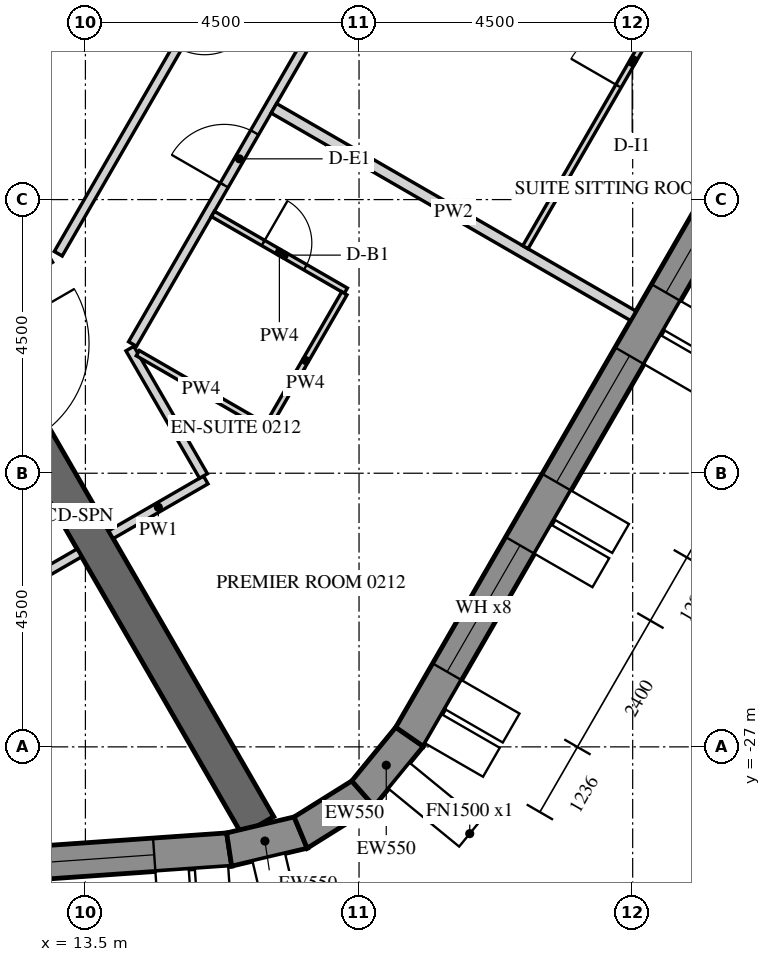
"""IFC4 building model, lengths in metres.
Left out: names, types, materials, properties, quantities, classifications, styles, units other than length and angle.
Written with IfcOpenShell. Run it as: python <this file> out.ifc"""

import sys

from ifc_helpers import new_model, si_unit, direction, frame, frame_2d, origin, place, context, subcontext, project, spatial, polyline, rectangle, outline, extrude, element, fill, save


model = new_model("IFC4")
c1 = context("Model", 3, precision=1e-05, world=origin(), true_north=direction((0.0, 1.0)))
c2 = subcontext(c1, "Body", "Model", "MODEL_VIEW")
j1 = project(units=[si_unit("LENGTHUNIT", "METRE"), si_unit("PLANEANGLEUNIT", "RADIAN")], contexts=[c1])
p1 = place(None, origin())
s1 = spatial("IfcSite", under=j1, at=p1, CompositionType="ELEMENT")
p2 = place(p1, origin())
s2 = spatial("IfcBuilding", under=s1, at=p2, CompositionType="ELEMENT")
p3 = place(p2, frame((0.0, 0.0, 49.2)))
s3 = spatial("IfcBuildingStorey", under=s2, at=p3, CompositionType="ELEMENT", Elevation=49.2)
p4 = place(p3, frame((-14.134, -30.786, -0.15), z_axis=(0.0, 0.0, 1.0), x_axis=(0.997564037441, 0.069756657061, 0.0)))
e1 = element("IfcWall", 1, at=p4, inside=s3, PredefinedType="SOLIDWALL", context=c2, shape_type="SweptSolid", body=[
    extrude(outline(polyline([(-0.026, -0.275), (30.094, -0.275), (30.049, 0.275), (0.026, 0.275), (-0.026, -0.275)])), origin(), (0.0, 0.0, 1.0), 3.9),
])
p5 = place(p4, frame((1.236, 0.0, 1.05)))
e2 = element("IfcOpeningElement", 2, at=p5, cuts=e1, PredefinedType="OPENING", context=c2, shape_type="SweptSolid", body=[
    extrude(rectangle(XDim=2.4, YDim=2.4, at=frame_2d((1.2, 1.2))), frame((0.0, 0.285, 0.0), z_axis=(0.0, -1.0, 0.0), x_axis=(1.0, 0.0, 0.0)), (0.0, 0.0, 1.0), 0.57),
])
p6 = place(p4, frame((4.835, 0.0, 1.05)))
e3 = element("IfcOpeningElement", 3, at=p6, cuts=e1, PredefinedType="OPENING", context=c2, shape_type="SweptSolid", body=[
    extrude(rectangle(XDim=2.4, YDim=2.4, at=frame_2d((1.2, 1.2))), frame((0.0, 0.285, 0.0), z_axis=(0.0, -1.0, 0.0), x_axis=(1.0, 0.0, 0.0)), (0.0, 0.0, 1.0), 0.57),
])
p7 = place(p4, frame((8.436, 0.0, 1.05)))
e4 = element("IfcOpeningElement", 4, at=p7, cuts=e1, PredefinedType="OPENING", context=c2, shape_type="SweptSolid", body=[
    extrude(rectangle(XDim=2.4, YDim=2.4, at=frame_2d((1.2, 1.2))), frame((0.0, 0.285, 0.0), z_axis=(0.0, -1.0, 0.0), x_axis=(1.0, 0.0, 0.0)), (0.0, 0.0, 1.0), 0.57),
])
p8 = place(p4, frame((12.035, 0.0, 1.05)))
e5 = element("IfcOpeningElement", 5, at=p8, cuts=e1, PredefinedType="OPENING", context=c2, shape_type="SweptSolid", body=[
    extrude(rectangle(XDim=2.4, YDim=2.4, at=frame_2d((1.2, 1.2))), frame((0.0, 0.285, 0.0), z_axis=(0.0, -1.0, 0.0), x_axis=(1.0, 0.0, 0.0)), (0.0, 0.0, 1.0), 0.57),
])
p9 = place(p4, frame((15.635, 0.0, 1.05)))
e6 = element("IfcOpeningElement", 6, at=p9, cuts=e1, PredefinedType="OPENING", context=c2, shape_type="SweptSolid", body=[
    extrude(rectangle(XDim=2.4, YDim=2.4, at=frame_2d((1.2, 1.2))), frame((0.0, 0.285, 0.0), z_axis=(0.0, -1.0, 0.0), x_axis=(1.0, 0.0, 0.0)), (0.0, 0.0, 1.0), 0.57),
])
p10 = place(p4, frame((19.236, 0.0, 1.05)))
e7 = element("IfcOpeningElement", 7, at=p10, cuts=e1, PredefinedType="OPENING", context=c2, shape_type="SweptSolid", body=[
    extrude(rectangle(XDim=2.4, YDim=2.4, at=frame_2d((1.2, 1.2))), frame((0.0, 0.285, 0.0), z_axis=(0.0, -1.0, 0.0), x_axis=(1.0, 0.0, 0.0)), (0.0, 0.0, 1.0), 0.57),
])
p11 = place(p4, frame((22.835, 0.0, 1.05)))
e8 = element("IfcOpeningElement", 8, at=p11, cuts=e1, PredefinedType="OPENING", context=c2, shape_type="SweptSolid", body=[
    extrude(rectangle(XDim=2.4, YDim=2.4, at=frame_2d((1.2, 1.2))), frame((0.0, 0.285, 0.0), z_axis=(0.0, -1.0, 0.0), x_axis=(1.0, 0.0, 0.0)), (0.0, 0.0, 1.0), 0.57),
])
p12 = place(p4, frame((26.436, 0.0, 1.05)))
e9 = element("IfcOpeningElement", 9, at=p12, cuts=e1, PredefinedType="OPENING", context=c2, shape_type="SweptSolid", body=[
    extrude(rectangle(XDim=2.4, YDim=2.4, at=frame_2d((1.2, 1.2))), frame((0.0, 0.285, 0.0), z_axis=(0.0, -1.0, 0.0), x_axis=(1.0, 0.0, 0.0)), (0.0, 0.0, 1.0), 0.57),
])
p13 = place(p3, frame((15.864, -28.688, -0.15), z_axis=(0.0, 0.0, 1.0), x_axis=(0.973063591128, 0.230536868247, 0.0)))
e10 = element("IfcWall", 10, at=p13, inside=s3, PredefinedType="SOLIDWALL", context=c2, shape_type="SweptSolid", body=[
    extrude(outline(polyline([(-0.022, -0.275), (1.253, -0.275), (1.163, 0.275), (0.022, 0.275), (-0.022, -0.275)])), origin(), (0.0, 0.0, 1.0), 3.9),
])
p14 = place(p3, frame((17.04, -28.41, -0.15), z_axis=(0.0, 0.0, 1.0), x_axis=(0.847952888306, 0.530071598195, 0.0)))
e11 = element("IfcWall", 11, at=p14, inside=s3, PredefinedType="SOLIDWALL", context=c2, shape_type="SweptSolid", body=[
    extrude(outline(polyline([(-0.045, -0.275), (1.253, -0.275), (1.163, 0.275), (0.045, 0.275), (-0.045, -0.275)])), origin(), (0.0, 0.0, 1.0), 3.9),
])
p15 = place(p3, frame((18.064, -27.769, -0.15), z_axis=(0.0, 0.0, 1.0), x_axis=(0.633842757806, 0.773461930787, 0.0)))
e12 = element("IfcWall", 12, at=p15, inside=s3, PredefinedType="SOLIDWALL", context=c2, shape_type="SweptSolid", body=[
    extrude(outline(polyline([(-0.045, -0.275), (1.231, -0.275), (1.186, 0.275), (0.045, 0.275), (-0.045, -0.275)])), origin(), (0.0, 0.0, 1.0), 3.9),
])
p16 = place(p3, frame((18.83, -26.835, -0.15), z_axis=(0.0, 0.0, 1.0), x_axis=(0.500003800416, 0.866023209602, 0.0)))
e13 = element("IfcWall", 13, at=p16, inside=s3, PredefinedType="SOLIDWALL", context=c2, shape_type="SweptSolid", body=[
    extrude(outline(polyline([(-0.022, -0.275), (30.097, -0.275), (30.045, 0.275), (0.022, 0.275), (-0.022, -0.275)])), origin(), (0.0, 0.0, 1.0), 3.9),
])
p17 = place(p16, frame((1.236, 0.0, 1.05)))
e14 = element("IfcOpeningElement", 14, at=p17, cuts=e13, PredefinedType="OPENING", context=c2, shape_type="SweptSolid", body=[
    extrude(rectangle(XDim=2.4, YDim=2.4, at=frame_2d((1.2, 1.2))), frame((0.0, 0.285, 0.0), z_axis=(0.0, -1.0, 0.0), x_axis=(1.0, 0.0, 0.0)), (0.0, 0.0, 1.0), 0.57),
])
p18 = place(p16, frame((4.835, 0.0, 1.05)))
e15 = element("IfcOpeningElement", 15, at=p18, cuts=e13, PredefinedType="OPENING", context=c2, shape_type="SweptSolid", body=[
    extrude(rectangle(XDim=2.4, YDim=2.4, at=frame_2d((1.2, 1.2))), frame((0.0, 0.285, 0.0), z_axis=(0.0, -1.0, 0.0), x_axis=(1.0, 0.0, 0.0)), (0.0, 0.0, 1.0), 0.57),
])
p19 = place(p16, frame((8.436, 0.0, 1.05)))
e16 = element("IfcOpeningElement", 16, at=p19, cuts=e13, PredefinedType="OPENING", context=c2, shape_type="SweptSolid", body=[
    extrude(rectangle(XDim=2.4, YDim=2.4, at=frame_2d((1.2, 1.2))), frame((0.0, 0.285, 0.0), z_axis=(0.0, -1.0, 0.0), x_axis=(1.0, 0.0, 0.0)), (0.0, 0.0, 1.0), 0.57),
])
p20 = place(p16, frame((12.035, 0.0, 1.05)))
e17 = element("IfcOpeningElement", 17, at=p20, cuts=e13, PredefinedType="OPENING", context=c2, shape_type="SweptSolid", body=[
    extrude(rectangle(XDim=2.4, YDim=2.4, at=frame_2d((1.2, 1.2))), frame((0.0, 0.285, 0.0), z_axis=(0.0, -1.0, 0.0), x_axis=(1.0, 0.0, 0.0)), (0.0, 0.0, 1.0), 0.57),
])
p21 = place(p16, frame((15.635, 0.0, 1.05)))
e18 = element("IfcOpeningElement", 18, at=p21, cuts=e13, PredefinedType="OPENING", context=c2, shape_type="SweptSolid", body=[
    extrude(rectangle(XDim=2.4, YDim=2.4, at=frame_2d((1.2, 1.2))), frame((0.0, 0.285, 0.0), z_axis=(0.0, -1.0, 0.0), x_axis=(1.0, 0.0, 0.0)), (0.0, 0.0, 1.0), 0.57),
])
p22 = place(p16, frame((19.236, 0.0, 1.05)))
e19 = element("IfcOpeningElement", 19, at=p22, cuts=e13, PredefinedType="OPENING", context=c2, shape_type="SweptSolid", body=[
    extrude(rectangle(XDim=2.4, YDim=2.4, at=frame_2d((1.2, 1.2))), frame((0.0, 0.285, 0.0), z_axis=(0.0, -1.0, 0.0), x_axis=(1.0, 0.0, 0.0)), (0.0, 0.0, 1.0), 0.57),
])
p23 = place(p16, frame((22.835, 0.0, 1.05)))
e20 = element("IfcOpeningElement", 20, at=p23, cuts=e13, PredefinedType="OPENING", context=c2, shape_type="SweptSolid", body=[
    extrude(rectangle(XDim=2.4, YDim=2.4, at=frame_2d((1.2, 1.2))), frame((0.0, 0.285, 0.0), z_axis=(0.0, -1.0, 0.0), x_axis=(1.0, 0.0, 0.0)), (0.0, 0.0, 1.0), 0.57),
])
p24 = place(p16, frame((26.436, 0.0, 1.05)))
e21 = element("IfcOpeningElement", 21, at=p24, cuts=e13, PredefinedType="OPENING", context=c2, shape_type="SweptSolid", body=[
    extrude(rectangle(XDim=2.4, YDim=2.4, at=frame_2d((1.2, 1.2))), frame((0.0, 0.285, 0.0), z_axis=(0.0, -1.0, 0.0), x_axis=(1.0, 0.0, 0.0)), (0.0, 0.0, 1.0), 0.57),
])
p25 = place(p3, frame((8.083, -14.0, -0.15), z_axis=(0.0, 0.0, 1.0), x_axis=(0.499997680643, -0.866026742862, 0.0)))
e22 = element("IfcWall", 22, at=p25, inside=s3, PredefinedType="SHEAR", context=c2, shape_type="SweptSolid", body=[
    extrude(rectangle(XDim=16.509, YDim=0.6, at=frame_2d((8.254, 0.0))), origin(), (0.0, 0.0, 1.0), 3.9),
])
p26 = place(p25, frame((7.354, 0.0, 0.15)))
e23 = element("IfcOpeningElement", 23, at=p26, cuts=e22, PredefinedType="OPENING", context=c2, shape_type="SweptSolid", body=[
    extrude(rectangle(XDim=1.8, YDim=2.4, at=frame_2d((0.9, 1.2))), frame((0.0, 0.31, 0.0), z_axis=(0.0, -1.0, 0.0), x_axis=(1.0, 0.0, 0.0)), (0.0, 0.0, 1.0), 0.62),
])
p27 = place(p3, frame((11.906, -24.673, 0.0), z_axis=(0.0, 0.0, 1.0), x_axis=(0.866013532718, 0.500020560727, 0.0)))
e24 = element("IfcWall", 24, at=p27, inside=s3, PredefinedType="PARTITIONING", context=c2, shape_type="SweptSolid", body=[
    extrude(rectangle(XDim=1.725, YDim=0.15, at=frame_2d((0.863, 0.0))), origin(), (0.0, 0.0, 1.0), 2.988),
])
p28 = place(p3, frame((13.92, -23.51, 0.0), z_axis=(0.0, 0.0, 1.0), x_axis=(0.866047807691, 0.499961193289, 0.0)))
e25 = element("IfcWall", 25, at=p28, inside=s3, PredefinedType="PARTITIONING", context=c2, shape_type="SweptSolid", body=[
    extrude(rectangle(XDim=1.8, YDim=0.15, at=frame_2d((0.9, 0.0))), origin(), (0.0, 0.0, 1.0), 2.988),
])
p29 = place(p3, frame((15.441, -22.545, 0.0), z_axis=(0.0, 0.0, 1.0), x_axis=(-0.500013622142, 0.866017538894, 0.0)))
e26 = element("IfcWall", 26, at=p29, inside=s3, PredefinedType="PARTITIONING", context=c2, shape_type="SweptSolid", body=[
    extrude(rectangle(XDim=2.419, YDim=0.15, at=frame_2d((1.21, 0.0))), origin(), (0.0, 0.0, 1.0), 2.988),
])
p30 = place(p3, frame((14.275, -20.375, 0.0), z_axis=(0.0, 0.0, 1.0), x_axis=(0.500001098408, 0.866024769617, 0.0)))
e27 = element("IfcWall", 27, at=p30, inside=s3, PredefinedType="PARTITIONING", context=c2, shape_type="SweptSolid", body=[
    extrude(rectangle(XDim=24.599, YDim=0.15, at=frame_2d((12.299, 0.0))), origin(), (0.0, 0.0, 1.0), 2.988),
])
p31 = place(p30, frame((3.016, 0.0, 0.0)))
e28 = element("IfcOpeningElement", 28, at=p31, cuts=e27, PredefinedType="OPENING", context=c2, shape_type="SweptSolid", body=[
    extrude(rectangle(XDim=1.0, YDim=2.1, at=frame_2d((0.5, 1.05))), frame((0.0, 0.085, 0.0), z_axis=(0.0, -1.0, 0.0), x_axis=(1.0, 0.0, 0.0)), (0.0, 0.0, 1.0), 0.17),
])
p32 = place(p30, frame((10.019, 0.0, 0.0)))
e29 = element("IfcOpeningElement", 29, at=p32, cuts=e27, PredefinedType="OPENING", context=c2, shape_type="SweptSolid", body=[
    extrude(rectangle(XDim=1.0, YDim=2.1, at=frame_2d((0.5, 1.05))), frame((0.0, 0.085, 0.0), z_axis=(0.0, -1.0, 0.0), x_axis=(1.0, 0.0, 0.0)), (0.0, 0.0, 1.0), 0.17),
])
p33 = place(p30, frame((22.459, 0.0, 0.0)))
e30 = element("IfcOpeningElement", 30, at=p33, cuts=e27, PredefinedType="OPENING", context=c2, shape_type="SweptSolid", body=[
    extrude(rectangle(XDim=1.0, YDim=2.1, at=frame_2d((0.5, 1.05))), frame((0.0, 0.085, 0.0), z_axis=(0.0, -1.0, 0.0), x_axis=(1.0, 0.0, 0.0)), (0.0, 0.0, 1.0), 0.17),
])
p34 = place(p3, frame((17.422, -11.324, 0.0), z_axis=(0.0, 0.0, 1.0), x_axis=(-0.499994979726, -0.866028302222, 0.0)))
e31 = element("IfcWall", 31, at=p34, inside=s3, PredefinedType="PARTITIONING", context=c2, shape_type="SweptSolid", body=[
    extrude(rectangle(XDim=8.737, YDim=0.15, at=frame_2d((4.368, 0.0))), origin(), (0.0, 0.0, 1.0), 2.988),
])
p35 = place(p34, frame((3.918, 0.0, 0.0)))
e32 = element("IfcOpeningElement", 32, at=p35, cuts=e31, PredefinedType="OPENING", context=c2, shape_type="SweptSolid", body=[
    extrude(rectangle(XDim=0.9, YDim=2.1, at=frame_2d((0.45, 1.05))), frame((0.0, 0.085, 0.0), z_axis=(0.0, -1.0, 0.0), x_axis=(1.0, 0.0, 0.0)), (0.0, 0.0, 1.0), 0.17),
])
p36 = place(p3, frame((12.924, -18.966, 0.0), z_axis=(0.0, 0.0, 1.0), x_axis=(-0.866038455972, -0.499977392266, 0.0)))
e33 = element("IfcWall", 33, at=p36, inside=s3, PredefinedType="PARTITIONING", context=c2, shape_type="SweptSolid", body=[
    extrude(rectangle(XDim=1.409, YDim=0.15, at=frame_2d((0.705, 0.0))), origin(), (0.0, 0.0, 1.0), 2.988),
])
p37 = place(p3, frame((15.597, -18.236, 0.0), z_axis=(0.0, 0.0, 1.0), x_axis=(0.866039067339, -0.499976333282, 0.0)))
e34 = element("IfcWall", 34, at=p37, inside=s3, PredefinedType="PARTITIONING", context=c2, shape_type="SweptSolid", body=[
    extrude(rectangle(XDim=2.525, YDim=0.1, at=frame_2d((1.262, 0.0))), origin(), (0.0, 0.0, 1.0), 2.988),
])
p38 = place(p37, frame((0.955, 0.0, 0.0)))
e35 = element("IfcOpeningElement", 35, at=p38, cuts=e34, PredefinedType="OPENING", context=c2, shape_type="SweptSolid", body=[
    extrude(rectangle(XDim=0.8, YDim=2.1, at=frame_2d((0.4, 1.05))), frame((0.0, 0.06, 0.0), z_axis=(0.0, -1.0, 0.0), x_axis=(1.0, 0.0, 0.0)), (0.0, 0.0, 1.0), 0.12),
])
p39 = place(p3, frame((17.758, -19.542, 0.0), z_axis=(0.0, 0.0, 1.0), x_axis=(-0.499990435942, -0.866030925526, 0.0)))
e36 = element("IfcWall", 36, at=p39, inside=s3, PredefinedType="PARTITIONING", context=c2, shape_type="SweptSolid", body=[
    extrude(rectangle(XDim=2.55, YDim=0.1, at=frame_2d((1.275, 0.0))), origin(), (0.0, 0.0, 1.0), 2.988),
])
p40 = place(p3, frame((16.44, -21.725, 0.0), z_axis=(0.0, 0.0, 1.0), x_axis=(-0.865980596518, 0.500077600433, 0.0)))
e37 = element("IfcWall", 37, at=p40, inside=s3, PredefinedType="PARTITIONING", context=c2, shape_type="SweptSolid", body=[
    extrude(rectangle(XDim=2.4, YDim=0.1, at=frame_2d((1.2, 0.0))), origin(), (0.0, 0.0, 1.0), 2.988),
])
p41 = place(p3, frame((22.51, -19.912, 0.0), z_axis=(0.0, 0.0, 1.0), x_axis=(-0.866019982719, 0.500009389444, 0.0)))
e38 = element("IfcWall", 38, at=p41, inside=s3, PredefinedType="PARTITIONING", context=c2, shape_type="SweptSolid", body=[
    extrude(rectangle(XDim=6.825, YDim=0.18, at=frame_2d((3.413, 0.0))), origin(), (0.0, 0.0, 1.0), 2.988),
])
p42 = place(p3, frame((20.736, -18.784, 0.0), z_axis=(0.0, 0.0, 1.0), x_axis=(0.499990956993, 0.866030624704, 0.0)))
e39 = element("IfcWall", 39, at=p42, inside=s3, PredefinedType="PARTITIONING", context=c2, shape_type="SweptSolid", body=[
    extrude(rectangle(XDim=7.11, YDim=0.1, at=frame_2d((3.555, 0.0))), origin(), (0.0, 0.0, 1.0), 2.988),
])
p43 = place(p42, frame((3.06, 0.0, 0.0)))
e40 = element("IfcOpeningElement", 40, at=p43, cuts=e39, PredefinedType="OPENING", context=c2, shape_type="SweptSolid", body=[
    extrude(rectangle(XDim=0.9, YDim=2.1, at=frame_2d((0.45, 1.05))), frame((0.0, 0.06, 0.0), z_axis=(0.0, -1.0, 0.0), x_axis=(1.0, 0.0, 0.0)), (0.0, 0.0, 1.0), 0.12),
])
p44 = place(p12, frame((0.0, 0.205, 0.0)))
e41 = element("IfcWindow", 41, at=p44, inside=s3, PartitioningType="DOUBLE_PANEL_VERTICAL", PredefinedType="WINDOW", context=c2, shape_type="SweptSolid", body=[
    extrude(rectangle(XDim=2.4, YDim=2.4, at=frame_2d((1.2, 1.2))), frame((0.0, 0.03, 0.0), z_axis=(0.0, -1.0, 0.0), x_axis=(1.0, 0.0, 0.0)), (0.0, 0.0, 1.0), 0.06),
])
fill(e9, e41)
p45 = place(p17, frame((0.0, 0.205, 0.0)))
e42 = element("IfcWindow", 42, at=p45, inside=s3, PartitioningType="DOUBLE_PANEL_VERTICAL", PredefinedType="WINDOW", context=c2, shape_type="SweptSolid", body=[
    extrude(rectangle(XDim=2.4, YDim=2.4, at=frame_2d((1.2, 1.2))), frame((0.0, 0.03, 0.0), z_axis=(0.0, -1.0, 0.0), x_axis=(1.0, 0.0, 0.0)), (0.0, 0.0, 1.0), 0.06),
])
fill(e14, e42)
p46 = place(p18, frame((0.0, 0.205, 0.0)))
e43 = element("IfcWindow", 43, at=p46, inside=s3, PartitioningType="DOUBLE_PANEL_VERTICAL", PredefinedType="WINDOW", context=c2, shape_type="SweptSolid", body=[
    extrude(rectangle(XDim=2.4, YDim=2.4, at=frame_2d((1.2, 1.2))), frame((0.0, 0.03, 0.0), z_axis=(0.0, -1.0, 0.0), x_axis=(1.0, 0.0, 0.0)), (0.0, 0.0, 1.0), 0.06),
])
fill(e15, e43)
p47 = place(p19, frame((0.0, 0.205, 0.0)))
e44 = element("IfcWindow", 44, at=p47, inside=s3, PartitioningType="DOUBLE_PANEL_VERTICAL", PredefinedType="WINDOW", context=c2, shape_type="SweptSolid", body=[
    extrude(rectangle(XDim=2.4, YDim=2.4, at=frame_2d((1.2, 1.2))), frame((0.0, 0.03, 0.0), z_axis=(0.0, -1.0, 0.0), x_axis=(1.0, 0.0, 0.0)), (0.0, 0.0, 1.0), 0.06),
])
fill(e16, e44)
p48 = place(p31, origin())
e45 = element("IfcDoor", 45, at=p48, inside=s3, OperationType="SINGLE_SWING_RIGHT", PredefinedType="DOOR", context=c2, shape_type="SweptSolid", body=[
    extrude(rectangle(XDim=1.0, YDim=2.1, at=frame_2d((0.5, 1.05))), frame((0.0, 0.025, 0.0), z_axis=(0.0, -1.0, 0.0), x_axis=(1.0, 0.0, 0.0)), (0.0, 0.0, 1.0), 0.05),
])
fill(e28, e45)
p49 = place(p38, origin())
e46 = element("IfcDoor", 46, at=p49, inside=s3, OperationType="SINGLE_SWING_LEFT", PredefinedType="DOOR", context=c2, shape_type="SweptSolid", body=[
    extrude(rectangle(XDim=0.8, YDim=2.1, at=frame_2d((0.4, 1.05))), frame((0.0, 0.025, 0.0), z_axis=(0.0, -1.0, 0.0), x_axis=(1.0, 0.0, 0.0)), (0.0, 0.0, 1.0), 0.05),
])
fill(e35, e46)
p50 = place(p43, origin())
e47 = element("IfcDoor", 47, at=p50, inside=s3, OperationType="SINGLE_SWING_RIGHT", PredefinedType="DOOR", context=c2, shape_type="SweptSolid", body=[
    extrude(rectangle(XDim=0.9, YDim=2.1, at=frame_2d((0.45, 1.05))), frame((0.0, 0.025, 0.0), z_axis=(0.0, -1.0, 0.0), x_axis=(1.0, 0.0, 0.0)), (0.0, 0.0, 1.0), 0.05),
])
fill(e40, e47)
save(model, sys.argv[1])
